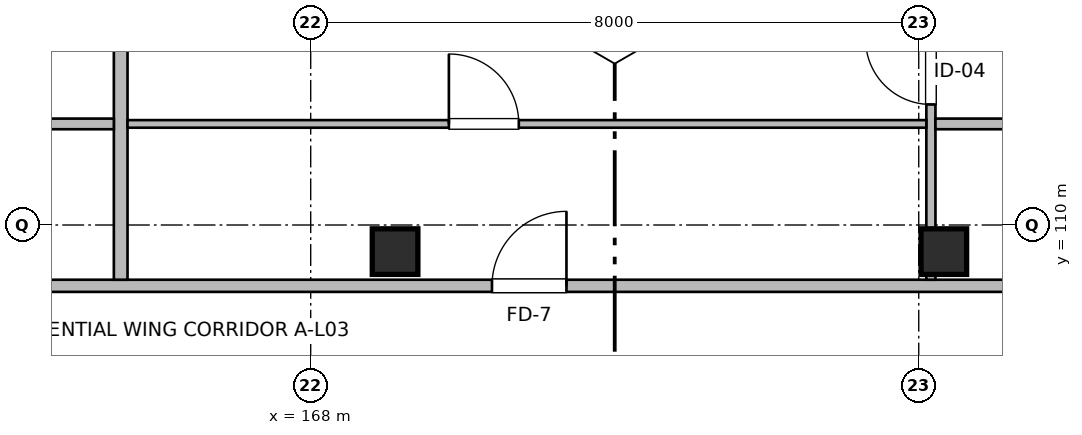
"""IFC4 building model, lengths in metres.
Left out: names, types, materials, properties, quantities, classifications, styles, units other than length and angle.
Written with IfcOpenShell. Run it as: python <this file> out.ifc"""

import sys

from ifc_helpers import new_model, si_unit, direction, frame, frame_2d, origin, origin_2d, place, context, subcontext, project, spatial, rectangle, extrude, element, fill, save


model = new_model("IFC4")
c1 = context("Model", 3, precision=1e-05, world=origin(), true_north=direction((0.0, 1.0)))
c2 = subcontext(c1, "Body", "Model", "MODEL_VIEW")
j1 = project(units=[si_unit("LENGTHUNIT", "METRE"), si_unit("PLANEANGLEUNIT", "RADIAN")], contexts=[c1])
p1 = place(None, origin())
s1 = spatial("IfcSite", under=j1, at=p1, CompositionType="ELEMENT")
p2 = place(p1, origin())
s2 = spatial("IfcBuilding", under=s1, at=p2, CompositionType="ELEMENT")
p3 = place(p2, frame((0.0, 0.0, 10.56)))
s3 = spatial("IfcBuildingStorey", under=s2, at=p3, CompositionType="ELEMENT", Elevation=10.56)
for number, where, z_axis, x_axis in (
    (1, (169.11, 109.65, 0.0), (0.0, 0.0, 1.0), (1.0, 0.0, 0.0)),
    (2, (176.33, 109.65, 0.0), (0.0, 0.0, 1.0), (1.0, 0.0, 0.0)),
):
    element("IfcColumn", number, at=place(p3, frame(where, z_axis=z_axis, x_axis=x_axis)), inside=s3, PredefinedType="COLUMN", context=c2, shape_type="SweptSolid", body=[
        extrude(rectangle(XDim=0.6, YDim=0.6, at=origin_2d()), origin(), (0.0, 0.0, 1.0), 3.2),
    ])
p4 = place(p3, frame((147.18, 109.2, 0.0), z_axis=(0.0, 0.0, 1.0), x_axis=(1.0, 0.0, 0.0)))
e3 = element("IfcWall", 3, at=p4, inside=s3, PredefinedType="PARTITIONING", context=c2, shape_type="SweptSolid", body=[
    extrude(rectangle(XDim=36.64, YDim=0.16, at=frame_2d((18.32, 0.0))), origin(), (0.0, 0.0, 1.0), 2.935),
])
p5 = place(p4, frame((4.795, 0.0, 0.0)))
e4 = element("IfcOpeningElement", 4, at=p5, cuts=e3, PredefinedType="OPENING", context=c2, shape_type="SweptSolid", body=[
    extrude(rectangle(XDim=0.98, YDim=2.15, at=frame_2d((0.49, 1.075))), frame((0.0, 0.09, 0.0), z_axis=(0.0, -1.0, 0.0), x_axis=(1.0, 0.0, 0.0)), (0.0, 0.0, 1.0), 0.18),
])
p6 = place(p4, frame((23.205, 0.0, 0.0)))
e5 = element("IfcOpeningElement", 5, at=p6, cuts=e3, PredefinedType="OPENING", context=c2, shape_type="SweptSolid", body=[
    extrude(rectangle(XDim=0.98, YDim=2.15, at=frame_2d((0.49, 1.075))), frame((0.0, 0.09, 0.0), z_axis=(0.0, -1.0, 0.0), x_axis=(1.0, 0.0, 0.0)), (0.0, 0.0, 1.0), 0.18),
])
p7 = place(p3, frame((165.5, 109.28, 0.0), z_axis=(0.0, 0.0, 1.0), x_axis=(0.0, 1.0, 0.0)))
e6 = element("IfcWall", 6, at=p7, inside=s3, PredefinedType="PARTITIONING", context=c2, shape_type="SweptSolid", body=[
    extrude(rectangle(XDim=6.59, YDim=0.18, at=frame_2d((3.295, 0.0))), origin(), (0.0, 0.0, 1.0), 2.935),
])
p8 = place(p3, frame((157.81, 111.33, 0.0), z_axis=(0.0, 0.0, 1.0), x_axis=(1.0, 0.0, 0.0)))
e7 = element("IfcWall", 7, at=p8, inside=s3, PredefinedType="PARTITIONING", context=c2, shape_type="SweptSolid", body=[
    extrude(rectangle(XDim=7.6, YDim=0.14, at=frame_2d((3.8, 0.0))), origin(), (0.0, 0.0, 1.0), 2.935),
])
p9 = place(p8, frame((3.064, 0.0, 0.0)))
e8 = element("IfcOpeningElement", 8, at=p9, cuts=e7, PredefinedType="OPENING", context=c2, shape_type="SweptSolid", body=[
    extrude(rectangle(XDim=0.85, YDim=2.05, at=frame_2d((0.425, 1.025))), frame((0.0, 0.08, 0.0), z_axis=(0.0, -1.0, 0.0), x_axis=(1.0, 0.0, 0.0)), (0.0, 0.0, 1.0), 0.16),
])
p10 = place(p3, frame((176.16, 109.28, 0.0), z_axis=(0.0, 0.0, 1.0), x_axis=(0.0, 1.0, 0.0)))
e9 = element("IfcWall", 9, at=p10, inside=s3, PredefinedType="PARTITIONING", context=c2, shape_type="SweptSolid", body=[
    extrude(rectangle(XDim=6.59, YDim=0.12, at=frame_2d((3.295, 0.0))), origin(), (0.0, 0.0, 1.0), 2.58),
])
p11 = place(p10, frame((2.306, 0.0, 0.0)))
e10 = element("IfcOpeningElement", 10, at=p11, cuts=e9, PredefinedType="OPENING", context=c2, shape_type="SweptSolid", body=[
    extrude(rectangle(XDim=0.86, YDim=2.1, at=frame_2d((0.43, 1.05))), frame((0.0, 0.07, 0.0), z_axis=(0.0, -1.0, 0.0), x_axis=(1.0, 0.0, 0.0)), (0.0, 0.0, 1.0), 0.14),
])
p12 = place(p10, frame((4.093, 0.0, 0.0)))
e11 = element("IfcOpeningElement", 11, at=p12, cuts=e9, PredefinedType="OPENING", context=c2, shape_type="SweptSolid", body=[
    extrude(rectangle(XDim=0.9, YDim=2.1, at=frame_2d((0.45, 1.05))), frame((0.0, 0.07, 0.0), z_axis=(0.0, -1.0, 0.0), x_axis=(1.0, 0.0, 0.0)), (0.0, 0.0, 1.0), 0.14),
])
p13 = place(p3, frame((176.22, 111.33, 0.0), z_axis=(0.0, 0.0, 1.0), x_axis=(1.0, 0.0, 0.0)))
e12 = element("IfcWall", 12, at=p13, inside=s3, PredefinedType="PARTITIONING", context=c2, shape_type="SweptSolid", body=[
    extrude(rectangle(XDim=7.6, YDim=0.14, at=frame_2d((3.8, 0.0))), origin(), (0.0, 0.0, 1.0), 2.935),
])
p14 = place(p13, frame((3.064, 0.0, 0.0)))
e13 = element("IfcOpeningElement", 13, at=p14, cuts=e12, PredefinedType="OPENING", context=c2, shape_type="SweptSolid", body=[
    extrude(rectangle(XDim=0.85, YDim=2.05, at=frame_2d((0.425, 1.025))), frame((0.0, 0.08, 0.0), z_axis=(0.0, -1.0, 0.0), x_axis=(1.0, 0.0, 0.0)), (0.0, 0.0, 1.0), 0.16),
])
p15 = place(p3, frame((165.59, 111.33, 0.0), z_axis=(0.0, 0.0, 1.0), x_axis=(1.0, 0.0, 0.0)))
e14 = element("IfcWall", 14, at=p15, inside=s3, PredefinedType="PARTITIONING", context=c2, shape_type="SweptSolid", body=[
    extrude(rectangle(XDim=10.51, YDim=0.1, at=frame_2d((5.255, 0.0))), origin(), (0.0, 0.0, 1.0), 2.935),
])
p16 = place(p15, frame((4.228, 0.0, 0.0)))
e15 = element("IfcOpeningElement", 15, at=p16, cuts=e14, PredefinedType="OPENING", context=c2, shape_type="SweptSolid", body=[
    extrude(rectangle(XDim=0.92, YDim=2.1, at=frame_2d((0.46, 1.05))), frame((0.0, 0.06, 0.0), z_axis=(0.0, -1.0, 0.0), x_axis=(1.0, 0.0, 0.0)), (0.0, 0.0, 1.0), 0.12),
])
p17 = place(p6, origin())
e16 = element("IfcDoor", 16, at=p17, inside=s3, OperationType="SINGLE_SWING_RIGHT", PredefinedType="DOOR", context=c2, shape_type="SweptSolid", body=[
    extrude(rectangle(XDim=0.98, YDim=2.15, at=frame_2d((0.49, 1.075))), frame((0.0, 0.025, 0.0), z_axis=(0.0, -1.0, 0.0), x_axis=(1.0, 0.0, 0.0)), (0.0, 0.0, 1.0), 0.05),
])
fill(e5, e16)
p18 = place(p16, origin())
e17 = element("IfcDoor", 17, at=p18, inside=s3, OperationType="SINGLE_SWING_LEFT", PredefinedType="DOOR", context=c2, shape_type="SweptSolid", body=[
    extrude(rectangle(XDim=0.92, YDim=2.1, at=frame_2d((0.46, 1.05))), frame((0.0, 0.025, 0.0), z_axis=(0.0, -1.0, 0.0), x_axis=(1.0, 0.0, 0.0)), (0.0, 0.0, 1.0), 0.05),
])
fill(e15, e17)
p19 = place(p11, origin())
e18 = element("IfcDoor", 18, at=p19, inside=s3, OperationType="SINGLE_SWING_RIGHT", PredefinedType="DOOR", context=c2, shape_type="SweptSolid", body=[
    extrude(rectangle(XDim=0.86, YDim=2.1, at=frame_2d((0.43, 1.05))), frame((0.0, 0.025, 0.0), z_axis=(0.0, -1.0, 0.0), x_axis=(1.0, 0.0, 0.0)), (0.0, 0.0, 1.0), 0.05),
])
fill(e10, e18)
save(model, sys.argv[1])
